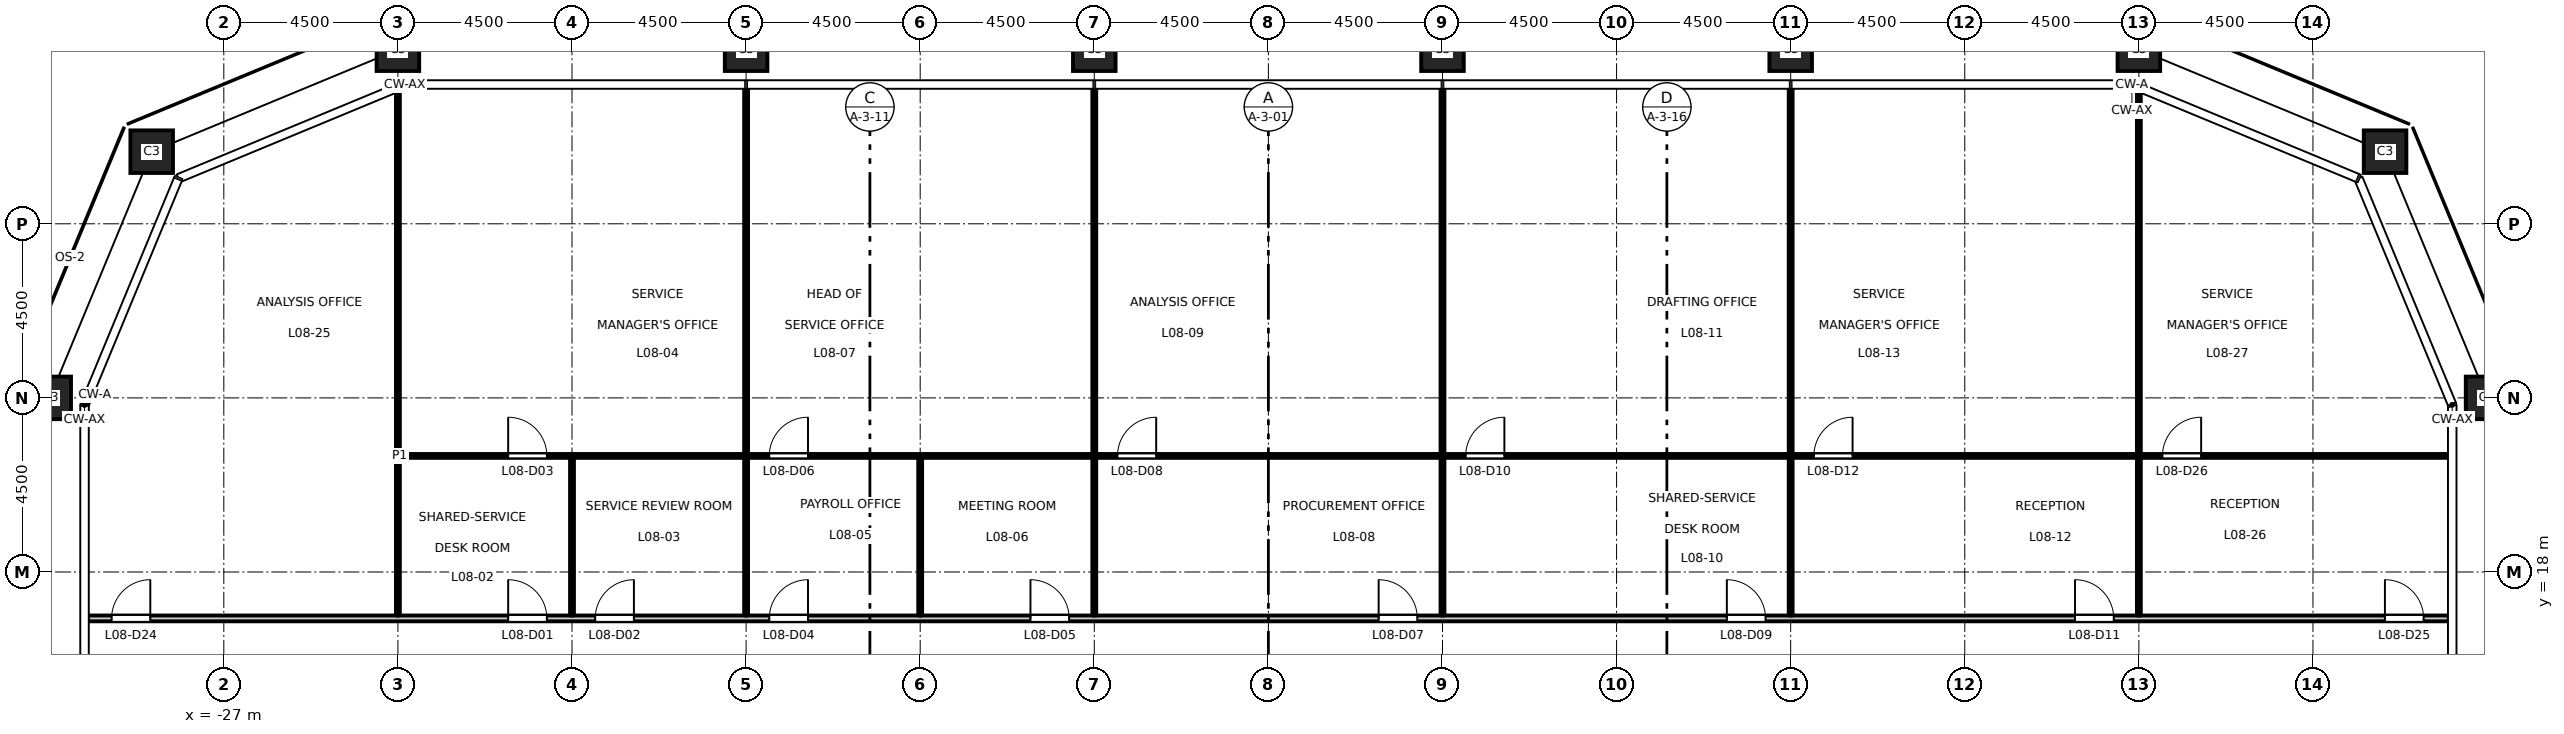
"""IFC4 building model, lengths in metres.
Left out: names, types, materials, properties, quantities, classifications, styles, units other than length and angle.
Written with IfcOpenShell. Run it as: python <this file> out.ifc"""

import sys

from ifc_helpers import new_model, si_unit, direction, frame, frame_2d, origin, origin_2d, place, context, subcontext, project, spatial, rectangle, hollow_rectangle, extrude, element, fill, save


model = new_model("IFC4")
c1 = context("Model", 3, precision=1e-05, world=origin(), true_north=direction((0.0, 1.0)))
c2 = subcontext(c1, "Body", "Model", "MODEL_VIEW")
j1 = project(units=[si_unit("LENGTHUNIT", "METRE"), si_unit("PLANEANGLEUNIT", "RADIAN")], contexts=[c1])
p1 = place(None, origin())
s1 = spatial("IfcSite", under=j1, at=p1, CompositionType="ELEMENT")
p2 = place(p1, origin())
s2 = spatial("IfcBuilding", under=s1, at=p2, CompositionType="ELEMENT")
p3 = place(p2, frame((0.0, 0.0, 40.2)))
s3 = spatial("IfcBuildingStorey", under=s2, at=p3, CompositionType="ELEMENT", Elevation=40.2)
for number, where, z_axis, x_axis in (
    (1, (31.5, 22.5, 0.0), (0.0, 0.0, 1.0), (1.0, 0.0, 0.0)),
    (2, (28.864, 28.864, 0.0), (0.0, 0.0, 1.0), (1.0, 0.0, 0.0)),
    (3, (22.5, 31.5, 0.0), (0.0, 0.0, 1.0), (1.0, 0.0, 0.0)),
    (4, (13.5, 31.5, 0.0), (0.0, 0.0, 1.0), (1.0, 0.0, 0.0)),
    (5, (4.5, 31.5, 0.0), (0.0, 0.0, 1.0), (1.0, 0.0, 0.0)),
    (6, (-4.5, 31.5, 0.0), (0.0, 0.0, 1.0), (1.0, 0.0, 0.0)),
    (7, (-13.5, 31.5, 0.0), (0.0, 0.0, 1.0), (1.0, 0.0, 0.0)),
    (8, (-22.5, 31.5, 0.0), (0.0, 0.0, 1.0), (1.0, 0.0, 0.0)),
    (9, (-28.864, 28.864, 0.0), (0.0, 0.0, 1.0), (1.0, 0.0, 0.0)),
    (10, (-31.5, 22.5, 0.0), (0.0, 0.0, 1.0), (1.0, 0.0, 0.0)),
):
    element("IfcColumn", number, at=place(p3, frame(where, z_axis=z_axis, x_axis=x_axis)), inside=s3, PredefinedType="COLUMN", context=c2, shape_type="SweptSolid", body=[
        extrude(hollow_rectangle(XDim=1.1, YDim=1.1, WallThickness=0.07, at=origin_2d()), origin(), (0.0, 0.0, 1.0), 4.5),
    ])
p4 = place(p3, frame((-30.51, 16.8, 0.0), z_axis=(0.0, 0.0, 1.0), x_axis=(1.0, 0.0, 0.0)))
e11 = element("IfcWall", 11, at=p4, inside=s3, PredefinedType="PARTITIONING", context=c2, shape_type="SweptSolid", body=[
    extrude(rectangle(XDim=61.02, YDim=0.15, at=frame_2d((30.51, 0.0))), origin(), (0.0, 0.0, 1.0), 4.35),
])
p5 = place(p4, frame((10.86, 0.0, 0.0)))
e12 = element("IfcOpeningElement", 12, at=p5, cuts=e11, PredefinedType="OPENING", context=c2, shape_type="SweptSolid", body=[
    extrude(rectangle(XDim=1.0, YDim=2.1, at=frame_2d((0.5, 1.05))), frame((0.0, 0.085, 0.0), z_axis=(0.0, -1.0, 0.0), x_axis=(1.0, 0.0, 0.0)), (0.0, 0.0, 1.0), 0.17),
])
p6 = place(p4, frame((13.11, 0.0, 0.0)))
e13 = element("IfcOpeningElement", 13, at=p6, cuts=e11, PredefinedType="OPENING", context=c2, shape_type="SweptSolid", body=[
    extrude(rectangle(XDim=1.0, YDim=2.1, at=frame_2d((0.5, 1.05))), frame((0.0, 0.085, 0.0), z_axis=(0.0, -1.0, 0.0), x_axis=(1.0, 0.0, 0.0)), (0.0, 0.0, 1.0), 0.17),
])
p7 = place(p4, frame((17.61, 0.0, 0.0)))
e14 = element("IfcOpeningElement", 14, at=p7, cuts=e11, PredefinedType="OPENING", context=c2, shape_type="SweptSolid", body=[
    extrude(rectangle(XDim=1.0, YDim=2.1, at=frame_2d((0.5, 1.05))), frame((0.0, 0.085, 0.0), z_axis=(0.0, -1.0, 0.0), x_axis=(1.0, 0.0, 0.0)), (0.0, 0.0, 1.0), 0.17),
])
p8 = place(p4, frame((24.36, 0.0, 0.0)))
e15 = element("IfcOpeningElement", 15, at=p8, cuts=e11, PredefinedType="OPENING", context=c2, shape_type="SweptSolid", body=[
    extrude(rectangle(XDim=1.0, YDim=2.1, at=frame_2d((0.5, 1.05))), frame((0.0, 0.085, 0.0), z_axis=(0.0, -1.0, 0.0), x_axis=(1.0, 0.0, 0.0)), (0.0, 0.0, 1.0), 0.17),
])
p9 = place(p4, frame((33.36, 0.0, 0.0)))
e16 = element("IfcOpeningElement", 16, at=p9, cuts=e11, PredefinedType="OPENING", context=c2, shape_type="SweptSolid", body=[
    extrude(rectangle(XDim=1.0, YDim=2.1, at=frame_2d((0.5, 1.05))), frame((0.0, 0.085, 0.0), z_axis=(0.0, -1.0, 0.0), x_axis=(1.0, 0.0, 0.0)), (0.0, 0.0, 1.0), 0.17),
])
p10 = place(p4, frame((42.36, 0.0, 0.0)))
e17 = element("IfcOpeningElement", 17, at=p10, cuts=e11, PredefinedType="OPENING", context=c2, shape_type="SweptSolid", body=[
    extrude(rectangle(XDim=1.0, YDim=2.1, at=frame_2d((0.5, 1.05))), frame((0.0, 0.085, 0.0), z_axis=(0.0, -1.0, 0.0), x_axis=(1.0, 0.0, 0.0)), (0.0, 0.0, 1.0), 0.17),
])
p11 = place(p4, frame((51.36, 0.0, 0.0)))
e18 = element("IfcOpeningElement", 18, at=p11, cuts=e11, PredefinedType="OPENING", context=c2, shape_type="SweptSolid", body=[
    extrude(rectangle(XDim=1.0, YDim=2.1, at=frame_2d((0.5, 1.05))), frame((0.0, 0.085, 0.0), z_axis=(0.0, -1.0, 0.0), x_axis=(1.0, 0.0, 0.0)), (0.0, 0.0, 1.0), 0.17),
])
p12 = place(p4, frame((0.61, 0.0, 0.0)))
e19 = element("IfcOpeningElement", 19, at=p12, cuts=e11, PredefinedType="OPENING", context=c2, shape_type="SweptSolid", body=[
    extrude(rectangle(XDim=1.0, YDim=2.1, at=frame_2d((0.5, 1.05))), frame((0.0, 0.085, 0.0), z_axis=(0.0, -1.0, 0.0), x_axis=(1.0, 0.0, 0.0)), (0.0, 0.0, 1.0), 0.17),
])
p13 = place(p4, frame((59.37, 0.0, 0.0)))
e20 = element("IfcOpeningElement", 20, at=p13, cuts=e11, PredefinedType="OPENING", context=c2, shape_type="SweptSolid", body=[
    extrude(rectangle(XDim=1.0, YDim=2.1, at=frame_2d((0.5, 1.05))), frame((0.0, 0.085, 0.0), z_axis=(0.0, -1.0, 0.0), x_axis=(1.0, 0.0, 0.0)), (0.0, 0.0, 1.0), 0.17),
])
p14 = place(p3, frame((-22.45, 21.0, 0.0), z_axis=(0.0, 0.0, 1.0), x_axis=(1.0, 0.0, 0.0)))
e21 = element("IfcWall", 21, at=p14, inside=s3, PredefinedType="PARTITIONING", context=c2, shape_type="SweptSolid", body=[
    extrude(rectangle(XDim=52.96, YDim=0.1, at=frame_2d((26.48, 0.0))), origin(), (0.0, 0.0, 1.0), 4.35),
])
p15 = place(p14, frame((2.8, 0.0, 0.0)))
e22 = element("IfcOpeningElement", 22, at=p15, cuts=e21, PredefinedType="OPENING", context=c2, shape_type="SweptSolid", body=[
    extrude(rectangle(XDim=1.0, YDim=2.1, at=frame_2d((0.5, 1.05))), frame((0.0, 0.06, 0.0), z_axis=(0.0, -1.0, 0.0), x_axis=(1.0, 0.0, 0.0)), (0.0, 0.0, 1.0), 0.12),
])
p16 = place(p14, frame((9.55, 0.0, 0.0)))
e23 = element("IfcOpeningElement", 23, at=p16, cuts=e21, PredefinedType="OPENING", context=c2, shape_type="SweptSolid", body=[
    extrude(rectangle(XDim=1.0, YDim=2.1, at=frame_2d((0.5, 1.05))), frame((0.0, 0.06, 0.0), z_axis=(0.0, -1.0, 0.0), x_axis=(1.0, 0.0, 0.0)), (0.0, 0.0, 1.0), 0.12),
])
p17 = place(p14, frame((18.55, 0.0, 0.0)))
e24 = element("IfcOpeningElement", 24, at=p17, cuts=e21, PredefinedType="OPENING", context=c2, shape_type="SweptSolid", body=[
    extrude(rectangle(XDim=1.0, YDim=2.1, at=frame_2d((0.5, 1.05))), frame((0.0, 0.06, 0.0), z_axis=(0.0, -1.0, 0.0), x_axis=(1.0, 0.0, 0.0)), (0.0, 0.0, 1.0), 0.12),
])
p18 = place(p14, frame((27.55, 0.0, 0.0)))
e25 = element("IfcOpeningElement", 25, at=p18, cuts=e21, PredefinedType="OPENING", context=c2, shape_type="SweptSolid", body=[
    extrude(rectangle(XDim=1.0, YDim=2.1, at=frame_2d((0.5, 1.05))), frame((0.0, 0.06, 0.0), z_axis=(0.0, -1.0, 0.0), x_axis=(1.0, 0.0, 0.0)), (0.0, 0.0, 1.0), 0.12),
])
p19 = place(p14, frame((36.55, 0.0, 0.0)))
e26 = element("IfcOpeningElement", 26, at=p19, cuts=e21, PredefinedType="OPENING", context=c2, shape_type="SweptSolid", body=[
    extrude(rectangle(XDim=1.0, YDim=2.1, at=frame_2d((0.5, 1.05))), frame((0.0, 0.06, 0.0), z_axis=(0.0, -1.0, 0.0), x_axis=(1.0, 0.0, 0.0)), (0.0, 0.0, 1.0), 0.12),
])
p20 = place(p14, frame((45.56, 0.0, 0.0)))
e27 = element("IfcOpeningElement", 27, at=p20, cuts=e21, PredefinedType="OPENING", context=c2, shape_type="SweptSolid", body=[
    extrude(rectangle(XDim=1.0, YDim=2.1, at=frame_2d((0.5, 1.05))), frame((0.0, 0.06, 0.0), z_axis=(0.0, -1.0, 0.0), x_axis=(1.0, 0.0, 0.0)), (0.0, 0.0, 1.0), 0.12),
])
p21 = place(p3, frame((-22.5, 16.875, 0.0), z_axis=(0.0, 0.0, 1.0), x_axis=(0.0, 1.0, 0.0)))
e28 = element("IfcWall", 28, at=p21, inside=s3, PredefinedType="PARTITIONING", context=c2, shape_type="SweptSolid", body=[
    extrude(rectangle(XDim=13.553, YDim=0.1, at=frame_2d((6.776, 0.0))), origin(), (0.0, 0.0, 1.0), 3.35),
])
p22 = place(p3, frame((-18.0, 16.875, 0.0), z_axis=(0.0, 0.0, 1.0), x_axis=(0.0, 1.0, 0.0)))
e29 = element("IfcWall", 29, at=p22, inside=s3, PredefinedType="PARTITIONING", context=c2, shape_type="SweptSolid", body=[
    extrude(rectangle(XDim=4.075, YDim=0.1, at=frame_2d((2.038, 0.0))), origin(), (0.0, 0.0, 1.0), 4.35),
])
p23 = place(p3, frame((-13.5, 16.875, 0.0), z_axis=(0.0, 0.0, 1.0), x_axis=(0.0, 1.0, 0.0)))
e30 = element("IfcWall", 30, at=p23, inside=s3, PredefinedType="PARTITIONING", context=c2, shape_type="SweptSolid", body=[
    extrude(rectangle(XDim=4.075, YDim=0.1, at=frame_2d((2.038, 0.0))), origin(), (0.0, 0.0, 1.0), 3.35),
])
p24 = place(p3, frame((-13.5, 21.05, 0.0), z_axis=(0.0, 0.0, 1.0), x_axis=(0.0, 1.0, 0.0)))
e31 = element("IfcWall", 31, at=p24, inside=s3, PredefinedType="PARTITIONING", context=c2, shape_type="SweptSolid", body=[
    extrude(rectangle(XDim=9.46, YDim=0.1, at=frame_2d((4.73, 0.0))), origin(), (0.0, 0.0, 1.0), 3.35),
])
p25 = place(p3, frame((-9.0, 16.875, 0.0), z_axis=(0.0, 0.0, 1.0), x_axis=(0.0, 1.0, 0.0)))
e32 = element("IfcWall", 32, at=p25, inside=s3, PredefinedType="PARTITIONING", context=c2, shape_type="SweptSolid", body=[
    extrude(rectangle(XDim=4.075, YDim=0.1, at=frame_2d((2.038, 0.0))), origin(), (0.0, 0.0, 1.0), 4.35),
])
p26 = place(p3, frame((-4.5, 16.875, 0.0), z_axis=(0.0, 0.0, 1.0), x_axis=(0.0, 1.0, 0.0)))
e33 = element("IfcWall", 33, at=p26, inside=s3, PredefinedType="PARTITIONING", context=c2, shape_type="SweptSolid", body=[
    extrude(rectangle(XDim=4.075, YDim=0.1, at=frame_2d((2.038, 0.0))), origin(), (0.0, 0.0, 1.0), 3.35),
])
p27 = place(p3, frame((-4.5, 21.05, 0.0), z_axis=(0.0, 0.0, 1.0), x_axis=(0.0, 1.0, 0.0)))
e34 = element("IfcWall", 34, at=p27, inside=s3, PredefinedType="PARTITIONING", context=c2, shape_type="SweptSolid", body=[
    extrude(rectangle(XDim=9.46, YDim=0.1, at=frame_2d((4.73, 0.0))), origin(), (0.0, 0.0, 1.0), 3.35),
])
p28 = place(p3, frame((4.5, 16.875, 0.0), z_axis=(0.0, 0.0, 1.0), x_axis=(0.0, 1.0, 0.0)))
e35 = element("IfcWall", 35, at=p28, inside=s3, PredefinedType="PARTITIONING", context=c2, shape_type="SweptSolid", body=[
    extrude(rectangle(XDim=4.075, YDim=0.1, at=frame_2d((2.038, 0.0))), origin(), (0.0, 0.0, 1.0), 3.35),
])
p29 = place(p3, frame((4.5, 21.05, 0.0), z_axis=(0.0, 0.0, 1.0), x_axis=(0.0, 1.0, 0.0)))
e36 = element("IfcWall", 36, at=p29, inside=s3, PredefinedType="PARTITIONING", context=c2, shape_type="SweptSolid", body=[
    extrude(rectangle(XDim=9.46, YDim=0.1, at=frame_2d((4.73, 0.0))), origin(), (0.0, 0.0, 1.0), 3.35),
])
p30 = place(p3, frame((13.5, 16.875, 0.0), z_axis=(0.0, 0.0, 1.0), x_axis=(0.0, 1.0, 0.0)))
e37 = element("IfcWall", 37, at=p30, inside=s3, PredefinedType="PARTITIONING", context=c2, shape_type="SweptSolid", body=[
    extrude(rectangle(XDim=4.075, YDim=0.1, at=frame_2d((2.038, 0.0))), origin(), (0.0, 0.0, 1.0), 3.35),
])
p31 = place(p3, frame((13.5, 21.05, 0.0), z_axis=(0.0, 0.0, 1.0), x_axis=(0.0, 1.0, 0.0)))
e38 = element("IfcWall", 38, at=p31, inside=s3, PredefinedType="PARTITIONING", context=c2, shape_type="SweptSolid", body=[
    extrude(rectangle(XDim=9.46, YDim=0.1, at=frame_2d((4.73, 0.0))), origin(), (0.0, 0.0, 1.0), 3.35),
])
p32 = place(p3, frame((22.5, 16.875, 0.0), z_axis=(0.0, 0.0, 1.0), x_axis=(0.0, 1.0, 0.0)))
e39 = element("IfcWall", 39, at=p32, inside=s3, PredefinedType="PARTITIONING", context=c2, shape_type="SweptSolid", body=[
    extrude(rectangle(XDim=4.075, YDim=0.1, at=frame_2d((2.038, 0.0))), origin(), (0.0, 0.0, 1.0), 3.35),
])
p33 = place(p3, frame((22.5, 21.05, 0.0), z_axis=(0.0, 0.0, 1.0), x_axis=(0.0, 1.0, 0.0)))
e40 = element("IfcWall", 40, at=p33, inside=s3, PredefinedType="PARTITIONING", context=c2, shape_type="SweptSolid", body=[
    extrude(rectangle(XDim=9.378, YDim=0.1, at=frame_2d((4.689, 0.0))), origin(), (0.0, 0.0, 1.0), 3.35),
])
p34 = place(p5, origin())
e41 = element("IfcDoor", 41, at=p34, inside=s3, OperationType="SINGLE_SWING_LEFT", PredefinedType="DOOR", context=c2, shape_type="SweptSolid", body=[
    extrude(rectangle(XDim=1.0, YDim=2.1, at=frame_2d((0.5, 1.05))), frame((0.0, 0.025, 0.0), z_axis=(0.0, -1.0, 0.0), x_axis=(1.0, 0.0, 0.0)), (0.0, 0.0, 1.0), 0.05),
])
fill(e12, e41)
p35 = place(p6, origin())
e42 = element("IfcDoor", 42, at=p35, inside=s3, OperationType="SINGLE_SWING_RIGHT", PredefinedType="DOOR", context=c2, shape_type="SweptSolid", body=[
    extrude(rectangle(XDim=1.0, YDim=2.1, at=frame_2d((0.5, 1.05))), frame((0.0, 0.025, 0.0), z_axis=(0.0, -1.0, 0.0), x_axis=(1.0, 0.0, 0.0)), (0.0, 0.0, 1.0), 0.05),
])
fill(e13, e42)
p36 = place(p15, origin())
e43 = element("IfcDoor", 43, at=p36, inside=s3, OperationType="SINGLE_SWING_LEFT", PredefinedType="DOOR", context=c2, shape_type="SweptSolid", body=[
    extrude(rectangle(XDim=1.0, YDim=2.1, at=frame_2d((0.5, 1.05))), frame((0.0, 0.025, 0.0), z_axis=(0.0, -1.0, 0.0), x_axis=(1.0, 0.0, 0.0)), (0.0, 0.0, 1.0), 0.05),
])
fill(e22, e43)
p37 = place(p7, origin())
e44 = element("IfcDoor", 44, at=p37, inside=s3, OperationType="SINGLE_SWING_RIGHT", PredefinedType="DOOR", context=c2, shape_type="SweptSolid", body=[
    extrude(rectangle(XDim=1.0, YDim=2.1, at=frame_2d((0.5, 1.05))), frame((0.0, 0.025, 0.0), z_axis=(0.0, -1.0, 0.0), x_axis=(1.0, 0.0, 0.0)), (0.0, 0.0, 1.0), 0.05),
])
fill(e14, e44)
p38 = place(p8, origin())
e45 = element("IfcDoor", 45, at=p38, inside=s3, OperationType="SINGLE_SWING_LEFT", PredefinedType="DOOR", context=c2, shape_type="SweptSolid", body=[
    extrude(rectangle(XDim=1.0, YDim=2.1, at=frame_2d((0.5, 1.05))), frame((0.0, 0.025, 0.0), z_axis=(0.0, -1.0, 0.0), x_axis=(1.0, 0.0, 0.0)), (0.0, 0.0, 1.0), 0.05),
])
fill(e15, e45)
p39 = place(p16, origin())
e46 = element("IfcDoor", 46, at=p39, inside=s3, OperationType="SINGLE_SWING_RIGHT", PredefinedType="DOOR", context=c2, shape_type="SweptSolid", body=[
    extrude(rectangle(XDim=1.0, YDim=2.1, at=frame_2d((0.5, 1.05))), frame((0.0, 0.025, 0.0), z_axis=(0.0, -1.0, 0.0), x_axis=(1.0, 0.0, 0.0)), (0.0, 0.0, 1.0), 0.05),
])
fill(e23, e46)
p40 = place(p9, origin())
e47 = element("IfcDoor", 47, at=p40, inside=s3, OperationType="SINGLE_SWING_LEFT", PredefinedType="DOOR", context=c2, shape_type="SweptSolid", body=[
    extrude(rectangle(XDim=1.0, YDim=2.1, at=frame_2d((0.5, 1.05))), frame((0.0, 0.025, 0.0), z_axis=(0.0, -1.0, 0.0), x_axis=(1.0, 0.0, 0.0)), (0.0, 0.0, 1.0), 0.05),
])
fill(e16, e47)
p41 = place(p17, origin())
e48 = element("IfcDoor", 48, at=p41, inside=s3, OperationType="SINGLE_SWING_RIGHT", PredefinedType="DOOR", context=c2, shape_type="SweptSolid", body=[
    extrude(rectangle(XDim=1.0, YDim=2.1, at=frame_2d((0.5, 1.05))), frame((0.0, 0.025, 0.0), z_axis=(0.0, -1.0, 0.0), x_axis=(1.0, 0.0, 0.0)), (0.0, 0.0, 1.0), 0.05),
])
fill(e24, e48)
p42 = place(p10, origin())
e49 = element("IfcDoor", 49, at=p42, inside=s3, OperationType="SINGLE_SWING_LEFT", PredefinedType="DOOR", context=c2, shape_type="SweptSolid", body=[
    extrude(rectangle(XDim=1.0, YDim=2.1, at=frame_2d((0.5, 1.05))), frame((0.0, 0.025, 0.0), z_axis=(0.0, -1.0, 0.0), x_axis=(1.0, 0.0, 0.0)), (0.0, 0.0, 1.0), 0.05),
])
fill(e17, e49)
p43 = place(p18, origin())
e50 = element("IfcDoor", 50, at=p43, inside=s3, OperationType="SINGLE_SWING_RIGHT", PredefinedType="DOOR", context=c2, shape_type="SweptSolid", body=[
    extrude(rectangle(XDim=1.0, YDim=2.1, at=frame_2d((0.5, 1.05))), frame((0.0, 0.025, 0.0), z_axis=(0.0, -1.0, 0.0), x_axis=(1.0, 0.0, 0.0)), (0.0, 0.0, 1.0), 0.05),
])
fill(e25, e50)
p44 = place(p11, origin())
e51 = element("IfcDoor", 51, at=p44, inside=s3, OperationType="SINGLE_SWING_LEFT", PredefinedType="DOOR", context=c2, shape_type="SweptSolid", body=[
    extrude(rectangle(XDim=1.0, YDim=2.1, at=frame_2d((0.5, 1.05))), frame((0.0, 0.025, 0.0), z_axis=(0.0, -1.0, 0.0), x_axis=(1.0, 0.0, 0.0)), (0.0, 0.0, 1.0), 0.05),
])
fill(e18, e51)
p45 = place(p19, origin())
e52 = element("IfcDoor", 52, at=p45, inside=s3, OperationType="SINGLE_SWING_RIGHT", PredefinedType="DOOR", context=c2, shape_type="SweptSolid", body=[
    extrude(rectangle(XDim=1.0, YDim=2.1, at=frame_2d((0.5, 1.05))), frame((0.0, 0.025, 0.0), z_axis=(0.0, -1.0, 0.0), x_axis=(1.0, 0.0, 0.0)), (0.0, 0.0, 1.0), 0.05),
])
fill(e26, e52)
p46 = place(p12, origin())
e53 = element("IfcDoor", 53, at=p46, inside=s3, OperationType="SINGLE_SWING_RIGHT", PredefinedType="DOOR", context=c2, shape_type="SweptSolid", body=[
    extrude(rectangle(XDim=1.0, YDim=2.1, at=frame_2d((0.5, 1.05))), frame((0.0, 0.025, 0.0), z_axis=(0.0, -1.0, 0.0), x_axis=(1.0, 0.0, 0.0)), (0.0, 0.0, 1.0), 0.05),
])
fill(e19, e53)
p47 = place(p13, origin())
e54 = element("IfcDoor", 54, at=p47, inside=s3, OperationType="SINGLE_SWING_LEFT", PredefinedType="DOOR", context=c2, shape_type="SweptSolid", body=[
    extrude(rectangle(XDim=1.0, YDim=2.1, at=frame_2d((0.5, 1.05))), frame((0.0, 0.025, 0.0), z_axis=(0.0, -1.0, 0.0), x_axis=(1.0, 0.0, 0.0)), (0.0, 0.0, 1.0), 0.05),
])
fill(e20, e54)
p48 = place(p20, origin())
e55 = element("IfcDoor", 55, at=p48, inside=s3, OperationType="SINGLE_SWING_RIGHT", PredefinedType="DOOR", context=c2, shape_type="SweptSolid", body=[
    extrude(rectangle(XDim=1.0, YDim=2.1, at=frame_2d((0.5, 1.05))), frame((0.0, 0.025, 0.0), z_axis=(0.0, -1.0, 0.0), x_axis=(1.0, 0.0, 0.0)), (0.0, 0.0, 1.0), 0.05),
])
fill(e27, e55)
save(model, sys.argv[1])
